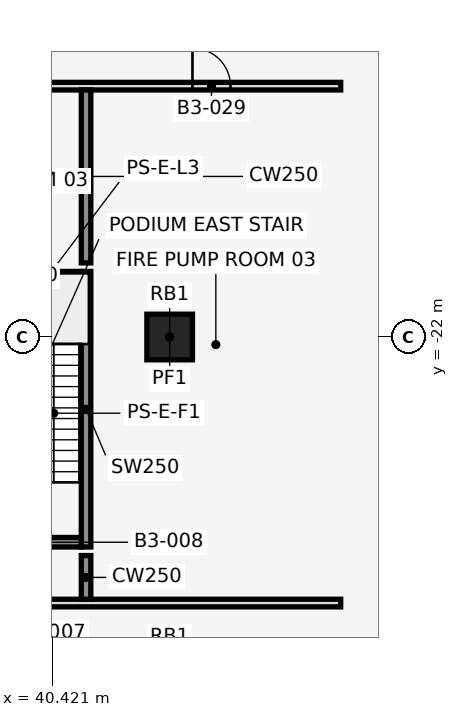
"""IFC4 building model, lengths in metres.
Left out: names, types, materials, properties, quantities, classifications, styles, units other than length and angle.
Written with IfcOpenShell. Run it as: python <this file> out.ifc"""

import sys

from ifc_helpers import new_model, si_unit, direction, frame, frame_2d, origin, origin_2d, place, context, subcontext, project, spatial, rectangle, extrude, element, fill, save


model = new_model("IFC4")
c1 = context("Model", 3, precision=1e-05, world=origin(), true_north=direction((0.0, 1.0)))
c2 = subcontext(c1, "Body", "Model", "MODEL_VIEW")
j1 = project(units=[si_unit("LENGTHUNIT", "METRE"), si_unit("PLANEANGLEUNIT", "RADIAN")], contexts=[c1])
p1 = place(None, origin())
s1 = spatial("IfcSite", under=j1, at=p1, CompositionType="ELEMENT")
p2 = place(p1, origin())
s2 = spatial("IfcBuilding", under=s1, at=p2, CompositionType="ELEMENT")
p3 = place(p2, frame((0.0, 0.0, -15.0)))
s3 = spatial("IfcBuildingStorey", under=s2, at=p3, CompositionType="ELEMENT", Elevation=-15.0)
p4 = place(p3, frame((43.5, -22.0, -0.3), z_axis=(0.0, 0.0, 1.0), x_axis=(1.0, 0.0, 0.0)))
e1 = element("IfcColumn", 1, at=p4, inside=s3, PredefinedType="COLUMN", context=c2, shape_type="SweptSolid", body=[
    extrude(rectangle(XDim=1.2, YDim=1.2, at=origin_2d()), origin(), (0.0, 0.0, 1.0), 5.3),
])
p5 = place(p3, frame((41.3, -27.525, 0.0), z_axis=(0.0, 0.0, 1.0), x_axis=(0.0, 1.0, 0.0)))
e2 = element("IfcWall", 2, at=p5, inside=s3, PredefinedType="SHEAR", context=c2, shape_type="SweptSolid", body=[
    extrude(rectangle(XDim=7.25, YDim=0.25, at=frame_2d((3.625, 0.0))), origin(), (0.0, 0.0, 1.0), 5.0),
])
p6 = place(p3, frame((38.125, -27.4, 0.0), z_axis=(0.0, 0.0, 1.0), x_axis=(1.0, 0.0, 0.0)))
e3 = element("IfcWall", 3, at=p6, inside=s3, PredefinedType="SHEAR", context=c2, shape_type="SweptSolid", body=[
    extrude(rectangle(XDim=3.05, YDim=0.25, at=frame_2d((1.525, 0.0))), origin(), (0.0, 0.0, 1.0), 5.0),
])
p7 = place(p6, frame((1.1, 0.0, 0.0)))
e4 = element("IfcOpeningElement", 4, at=p7, cuts=e3, PredefinedType="OPENING", context=c2, shape_type="SweptSolid", body=[
    extrude(rectangle(XDim=0.9, YDim=2.1, at=frame_2d((0.45, 1.05))), frame((0.0, 0.137, 0.0), z_axis=(0.0, -1.0, 0.0), x_axis=(1.0, 0.0, 0.0)), (0.0, 0.0, 1.0), 0.274),
])
p8 = place(p3, frame((38.125, -20.4, 0.0), z_axis=(0.0, 0.0, 1.0), x_axis=(1.0, 0.0, 0.0)))
e5 = element("IfcWall", 5, at=p8, inside=s3, PredefinedType="SHEAR", context=c2, shape_type="SweptSolid", body=[
    extrude(rectangle(XDim=3.05, YDim=0.25, at=frame_2d((1.525, 0.0))), origin(), (0.0, 0.0, 1.0), 5.0),
])
p9 = place(p3, frame((19.575, -29.0, 0.0), z_axis=(0.0, 0.0, 1.0), x_axis=(1.0, 0.0, 0.0)))
e6 = element("IfcWall", 6, at=p9, inside=s3, PredefinedType="PARTITIONING", context=c2, shape_type="SweptSolid", body=[
    extrude(rectangle(XDim=28.425, YDim=0.2, at=frame_2d((14.212, 0.0))), origin(), (0.0, 0.0, 1.0), 4.7),
])
p10 = place(p9, frame((1.225, 0.0, 0.0)))
e7 = element("IfcOpeningElement", 7, at=p10, cuts=e6, PredefinedType="OPENING", context=c2, shape_type="SweptSolid", body=[
    extrude(rectangle(XDim=1.2, YDim=2.1, at=frame_2d((0.6, 1.05))), frame((0.0, 0.112, 0.0), z_axis=(0.0, -1.0, 0.0), x_axis=(1.0, 0.0, 0.0)), (0.0, 0.0, 1.0), 0.224),
])
p11 = place(p9, frame((19.425, 0.0, 0.0)))
e8 = element("IfcOpeningElement", 8, at=p11, cuts=e6, PredefinedType="OPENING", context=c2, shape_type="SweptSolid", body=[
    extrude(rectangle(XDim=1.2, YDim=2.1, at=frame_2d((0.6, 1.05))), frame((0.0, 0.112, 0.0), z_axis=(0.0, -1.0, 0.0), x_axis=(1.0, 0.0, 0.0)), (0.0, 0.0, 1.0), 0.224),
])
p12 = place(p3, frame((19.575, -15.4, 0.0), z_axis=(0.0, 0.0, 1.0), x_axis=(1.0, 0.0, 0.0)))
e9 = element("IfcWall", 9, at=p12, inside=s3, PredefinedType="PARTITIONING", context=c2, shape_type="SweptSolid", body=[
    extrude(rectangle(XDim=28.425, YDim=0.2, at=frame_2d((14.212, 0.0))), origin(), (0.0, 0.0, 1.0), 4.7),
])
p13 = place(p12, frame((1.325, 0.0, 0.0)))
e10 = element("IfcOpeningElement", 10, at=p13, cuts=e9, PredefinedType="OPENING", context=c2, shape_type="SweptSolid", body=[
    extrude(rectangle(XDim=0.9, YDim=2.1, at=frame_2d((0.45, 1.05))), frame((0.0, 0.112, 0.0), z_axis=(0.0, -1.0, 0.0), x_axis=(1.0, 0.0, 0.0)), (0.0, 0.0, 1.0), 0.224),
])
p14 = place(p12, frame((5.925, 0.0, 0.0)))
e11 = element("IfcOpeningElement", 11, at=p14, cuts=e9, PredefinedType="OPENING", context=c2, shape_type="SweptSolid", body=[
    extrude(rectangle(XDim=1.0, YDim=2.1, at=frame_2d((0.5, 1.05))), frame((0.0, 0.112, 0.0), z_axis=(0.0, -1.0, 0.0), x_axis=(1.0, 0.0, 0.0)), (0.0, 0.0, 1.0), 0.224),
])
p15 = place(p12, frame((11.825, 0.0, 0.0)))
e12 = element("IfcOpeningElement", 12, at=p15, cuts=e9, PredefinedType="OPENING", context=c2, shape_type="SweptSolid", body=[
    extrude(rectangle(XDim=1.0, YDim=2.1, at=frame_2d((0.5, 1.05))), frame((0.0, 0.112, 0.0), z_axis=(0.0, -1.0, 0.0), x_axis=(1.0, 0.0, 0.0)), (0.0, 0.0, 1.0), 0.224),
])
p16 = place(p12, frame((16.325, 0.0, 0.0)))
e13 = element("IfcOpeningElement", 13, at=p16, cuts=e9, PredefinedType="OPENING", context=c2, shape_type="SweptSolid", body=[
    extrude(rectangle(XDim=1.0, YDim=2.1, at=frame_2d((0.5, 1.05))), frame((0.0, 0.112, 0.0), z_axis=(0.0, -1.0, 0.0), x_axis=(1.0, 0.0, 0.0)), (0.0, 0.0, 1.0), 0.224),
])
p17 = place(p12, frame((19.625, 0.0, 0.0)))
e14 = element("IfcOpeningElement", 14, at=p17, cuts=e9, PredefinedType="OPENING", context=c2, shape_type="SweptSolid", body=[
    extrude(rectangle(XDim=0.9, YDim=2.1, at=frame_2d((0.45, 1.05))), frame((0.0, 0.112, 0.0), z_axis=(0.0, -1.0, 0.0), x_axis=(1.0, 0.0, 0.0)), (0.0, 0.0, 1.0), 0.224),
])
p18 = place(p12, frame((24.525, 0.0, 0.0)))
e15 = element("IfcOpeningElement", 15, at=p18, cuts=e9, PredefinedType="OPENING", context=c2, shape_type="SweptSolid", body=[
    extrude(rectangle(XDim=1.0, YDim=2.1, at=frame_2d((0.5, 1.05))), frame((0.0, 0.112, 0.0), z_axis=(0.0, -1.0, 0.0), x_axis=(1.0, 0.0, 0.0)), (0.0, 0.0, 1.0), 0.224),
])
p19 = place(p3, frame((41.3, -28.9, 0.0), z_axis=(0.0, 0.0, 1.0), x_axis=(0.0, 1.0, 0.0)))
e16 = element("IfcWall", 16, at=p19, inside=s3, PredefinedType="SHEAR", context=c2, shape_type="SweptSolid", body=[
    extrude(rectangle(XDim=1.15, YDim=0.25, at=frame_2d((0.575, 0.0))), origin(), (0.0, 0.0, 1.0), 5.0),
])
p20 = place(p3, frame((41.3, -20.05, 0.0), z_axis=(0.0, 0.0, 1.0), x_axis=(0.0, 1.0, 0.0)))
e17 = element("IfcWall", 17, at=p20, inside=s3, PredefinedType="SHEAR", context=c2, shape_type="SweptSolid", body=[
    extrude(rectangle(XDim=4.55, YDim=0.25, at=frame_2d((2.275, 0.0))), origin(), (0.0, 0.0, 1.0), 5.0),
])
p21 = place(p18, frame((1.0, 0.0, 0.0), z_axis=(0.0, 0.0, 1.0), x_axis=(-1.0, 0.0, 0.0)))
e18 = element("IfcDoor", 18, at=p21, inside=s3, OperationType="SINGLE_SWING_RIGHT", PredefinedType="DOOR", context=c2, shape_type="SweptSolid", body=[
    extrude(rectangle(XDim=1.0, YDim=2.1, at=frame_2d((0.5, 1.05))), frame((0.0, 0.025, 0.0), z_axis=(0.0, -1.0, 0.0), x_axis=(1.0, 0.0, 0.0)), (0.0, 0.0, 1.0), 0.05),
])
fill(e15, e18)
save(model, sys.argv[1])
